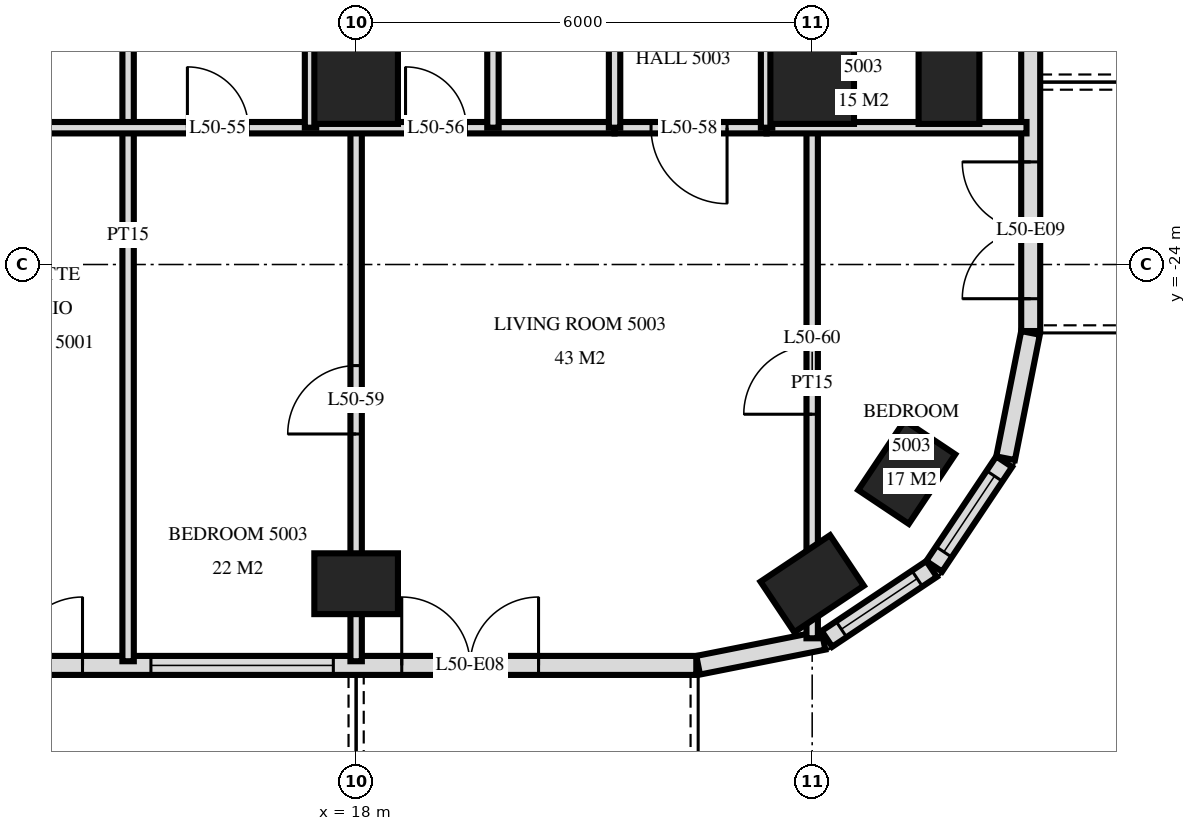
"""IFC4 building model, lengths in metres.
Left out: names, types, materials, properties, quantities, classifications, styles, units other than length and angle.
Written with IfcOpenShell. Run it as: python <this file> out.ifc"""

import sys

from ifc_helpers import new_model, si_unit, direction, frame, frame_2d, origin, origin_2d, place, context, subcontext, project, spatial, rectangle, extrude, element, fill, save


model = new_model("IFC4")
c1 = context("Model", 3, precision=1e-05, world=origin(), true_north=direction((0.0, 1.0)))
c2 = subcontext(c1, "Body", "Model", "MODEL_VIEW")
j1 = project(units=[si_unit("LENGTHUNIT", "METRE"), si_unit("PLANEANGLEUNIT", "RADIAN")], contexts=[c1])
p1 = place(None, origin())
s1 = spatial("IfcSite", under=j1, at=p1, CompositionType="ELEMENT")
p2 = place(p1, origin())
s2 = spatial("IfcBuilding", under=s1, at=p2, CompositionType="ELEMENT")
p3 = place(p2, frame((0.0, 0.0, 194.1)))
s3 = spatial("IfcBuildingStorey", under=s2, at=p3, CompositionType="ELEMENT", Elevation=194.1)
p4 = place(p3, frame((18.0, -28.2, 0.0), z_axis=(0.0, 0.0, 1.0), x_axis=(1.0, 0.0, 0.0)))
e1 = element("IfcColumn", 1, at=p4, inside=s3, PredefinedType="COLUMN", context=c2, shape_type="SweptSolid", body=[
    extrude(rectangle(XDim=1.1, YDim=0.8, at=origin_2d()), origin(), (0.0, 0.0, 1.0), 3.5),
])
p5 = place(p3, frame((18.0, -21.6, 0.0), z_axis=(0.0, 0.0, 1.0), x_axis=(1.0, 0.0, 0.0)))
e2 = element("IfcColumn", 2, at=p5, inside=s3, PredefinedType="COLUMN", context=c2, shape_type="SweptSolid", body=[
    extrude(rectangle(XDim=1.1, YDim=1.1, at=origin_2d()), origin(), (0.0, 0.0, 1.0), 3.5),
])
p6 = place(p3, frame((24.0, -28.2, 0.0), z_axis=(0.0, 0.0, 1.0), x_axis=(0.831459915646, 0.555584744817, 0.0)))
e3 = element("IfcColumn", 3, at=p6, inside=s3, PredefinedType="COLUMN", context=c2, shape_type="SweptSolid", body=[
    extrude(rectangle(XDim=1.1, YDim=0.8, at=origin_2d()), origin(), (0.0, 0.0, 1.0), 3.5),
])
p7 = place(p3, frame((24.0, -21.6, 0.0), z_axis=(0.0, 0.0, 1.0), x_axis=(1.0, 0.0, 0.0)))
e4 = element("IfcColumn", 4, at=p7, inside=s3, PredefinedType="COLUMN", context=c2, shape_type="SweptSolid", body=[
    extrude(rectangle(XDim=1.1, YDim=1.1, at=origin_2d()), origin(), (0.0, 0.0, 1.0), 3.5),
])
for number, where, z_axis, x_axis in (
    (5, (25.244, -26.733, 0.0), (0.0, 0.0, 1.0), (0.556, 0.831, 0.0)),
    (6, (25.8, -21.6, 0.0), (0.0, 0.0, 1.0), (0.0, 1.0, 0.0)),
):
    element("IfcColumn", number, at=place(p3, frame(where, z_axis=z_axis, x_axis=x_axis)), inside=s3, PredefinedType="COLUMN", context=c2, shape_type="SweptSolid", body=[
        extrude(rectangle(XDim=1.1, YDim=0.8, at=origin_2d()), origin(), (0.0, 0.0, 1.0), 3.5),
    ])
p8 = place(p3, frame((-22.475, -29.275, 0.0), z_axis=(0.0, 0.0, 1.0), x_axis=(1.0, 0.0, 0.0)))
e7 = element("IfcWall", 7, at=p8, inside=s3, PredefinedType="SOLIDWALL", context=c2, shape_type="SweptSolid", body=[
    extrude(rectangle(XDim=44.951, YDim=0.25, at=frame_2d((22.475, 0.0))), origin(), (0.0, 0.0, 1.0), 3.22),
])
p9 = place(p8, frame((0.575, 0.0, 0.0)))
e8 = element("IfcOpeningElement", 8, at=p9, cuts=e7, PredefinedType="OPENING", context=c2, shape_type="SweptSolid", body=[
    extrude(rectangle(XDim=1.8, YDim=2.4, at=frame_2d((0.9, 1.2))), frame((0.0, 0.135, 0.0), z_axis=(0.0, -1.0, 0.0), x_axis=(1.0, 0.0, 0.0)), (0.0, 0.0, 1.0), 0.27),
])
p10 = place(p8, frame((6.575, 0.0, 0.0)))
e9 = element("IfcOpeningElement", 9, at=p10, cuts=e7, PredefinedType="OPENING", context=c2, shape_type="SweptSolid", body=[
    extrude(rectangle(XDim=1.8, YDim=2.4, at=frame_2d((0.9, 1.2))), frame((0.0, 0.135, 0.0), z_axis=(0.0, -1.0, 0.0), x_axis=(1.0, 0.0, 0.0)), (0.0, 0.0, 1.0), 0.27),
])
p11 = place(p8, frame((11.075, 0.0, 0.0)))
e10 = element("IfcOpeningElement", 10, at=p11, cuts=e7, PredefinedType="OPENING", context=c2, shape_type="SweptSolid", body=[
    extrude(rectangle(XDim=1.8, YDim=2.4, at=frame_2d((0.9, 1.2))), frame((0.0, 0.135, 0.0), z_axis=(0.0, -1.0, 0.0), x_axis=(1.0, 0.0, 0.0)), (0.0, 0.0, 1.0), 0.27),
])
p12 = place(p8, frame((13.775, 0.0, 0.9)))
e11 = element("IfcOpeningElement", 11, at=p12, cuts=e7, PredefinedType="OPENING", context=c2, shape_type="SweptSolid", body=[
    extrude(rectangle(XDim=2.4, YDim=1.5, at=frame_2d((1.2, 0.75))), frame((0.0, 0.135, 0.0), z_axis=(0.0, -1.0, 0.0), x_axis=(1.0, 0.0, 0.0)), (0.0, 0.0, 1.0), 0.27),
])
p13 = place(p8, frame((16.775, 0.0, 0.9)))
e12 = element("IfcOpeningElement", 12, at=p13, cuts=e7, PredefinedType="OPENING", context=c2, shape_type="SweptSolid", body=[
    extrude(rectangle(XDim=2.4, YDim=1.5, at=frame_2d((1.2, 0.75))), frame((0.0, 0.135, 0.0), z_axis=(0.0, -1.0, 0.0), x_axis=(1.0, 0.0, 0.0)), (0.0, 0.0, 1.0), 0.27),
])
p14 = place(p8, frame((20.075, 0.0, 0.0)))
e13 = element("IfcOpeningElement", 13, at=p14, cuts=e7, PredefinedType="OPENING", context=c2, shape_type="SweptSolid", body=[
    extrude(rectangle(XDim=1.8, YDim=2.4, at=frame_2d((0.9, 1.2))), frame((0.0, 0.135, 0.0), z_axis=(0.0, -1.0, 0.0), x_axis=(1.0, 0.0, 0.0)), (0.0, 0.0, 1.0), 0.27),
])
p15 = place(p8, frame((23.075, 0.0, 0.0)))
e14 = element("IfcOpeningElement", 14, at=p15, cuts=e7, PredefinedType="OPENING", context=c2, shape_type="SweptSolid", body=[
    extrude(rectangle(XDim=1.8, YDim=2.4, at=frame_2d((0.9, 1.2))), frame((0.0, 0.135, 0.0), z_axis=(0.0, -1.0, 0.0), x_axis=(1.0, 0.0, 0.0)), (0.0, 0.0, 1.0), 0.27),
])
p16 = place(p8, frame((25.775, 0.0, 0.9)))
e15 = element("IfcOpeningElement", 15, at=p16, cuts=e7, PredefinedType="OPENING", context=c2, shape_type="SweptSolid", body=[
    extrude(rectangle(XDim=2.4, YDim=1.5, at=frame_2d((1.2, 0.75))), frame((0.0, 0.135, 0.0), z_axis=(0.0, -1.0, 0.0), x_axis=(1.0, 0.0, 0.0)), (0.0, 0.0, 1.0), 0.27),
])
p17 = place(p8, frame((29.075, 0.0, 0.0)))
e16 = element("IfcOpeningElement", 16, at=p17, cuts=e7, PredefinedType="OPENING", context=c2, shape_type="SweptSolid", body=[
    extrude(rectangle(XDim=1.8, YDim=2.4, at=frame_2d((0.9, 1.2))), frame((0.0, 0.135, 0.0), z_axis=(0.0, -1.0, 0.0), x_axis=(1.0, 0.0, 0.0)), (0.0, 0.0, 1.0), 0.27),
])
p18 = place(p8, frame((31.775, 0.0, 0.9)))
e17 = element("IfcOpeningElement", 17, at=p18, cuts=e7, PredefinedType="OPENING", context=c2, shape_type="SweptSolid", body=[
    extrude(rectangle(XDim=2.4, YDim=1.5, at=frame_2d((1.2, 0.75))), frame((0.0, 0.135, 0.0), z_axis=(0.0, -1.0, 0.0), x_axis=(1.0, 0.0, 0.0)), (0.0, 0.0, 1.0), 0.27),
])
p19 = place(p8, frame((35.075, 0.0, 0.0)))
e18 = element("IfcOpeningElement", 18, at=p19, cuts=e7, PredefinedType="OPENING", context=c2, shape_type="SweptSolid", body=[
    extrude(rectangle(XDim=1.8, YDim=2.4, at=frame_2d((0.9, 1.2))), frame((0.0, 0.135, 0.0), z_axis=(0.0, -1.0, 0.0), x_axis=(1.0, 0.0, 0.0)), (0.0, 0.0, 1.0), 0.27),
])
p20 = place(p8, frame((37.775, 0.0, 0.9)))
e19 = element("IfcOpeningElement", 19, at=p20, cuts=e7, PredefinedType="OPENING", context=c2, shape_type="SweptSolid", body=[
    extrude(rectangle(XDim=2.4, YDim=1.5, at=frame_2d((1.2, 0.75))), frame((0.0, 0.135, 0.0), z_axis=(0.0, -1.0, 0.0), x_axis=(1.0, 0.0, 0.0)), (0.0, 0.0, 1.0), 0.27),
])
p21 = place(p8, frame((41.075, 0.0, 0.0)))
e20 = element("IfcOpeningElement", 20, at=p21, cuts=e7, PredefinedType="OPENING", context=c2, shape_type="SweptSolid", body=[
    extrude(rectangle(XDim=1.8, YDim=2.4, at=frame_2d((0.9, 1.2))), frame((0.0, 0.135, 0.0), z_axis=(0.0, -1.0, 0.0), x_axis=(1.0, 0.0, 0.0)), (0.0, 0.0, 1.0), 0.27),
])
p22 = place(p3, frame((22.5, -29.273, 0.0), z_axis=(0.0, 0.0, 1.0), x_axis=(0.980775640221, 0.19513878023, 0.0)))
e21 = element("IfcWall", 21, at=p22, inside=s3, PredefinedType="SOLIDWALL", context=c2, shape_type="SweptSolid", body=[
    extrude(rectangle(XDim=1.681, YDim=0.25, at=frame_2d((0.841, 0.0))), origin(), (0.0, 0.0, 1.0), 3.22),
])
p23 = place(p3, frame((24.194, -28.926, 0.0), z_axis=(0.0, 0.0, 1.0), x_axis=(0.831482937015, 0.55555029066, 0.0)))
e22 = element("IfcWall", 22, at=p23, inside=s3, PredefinedType="SOLIDWALL", context=c2, shape_type="SweptSolid", body=[
    extrude(rectangle(XDim=1.656, YDim=0.25, at=frame_2d((0.828, 0.0))), origin(), (0.0, 0.0, 1.0), 3.22),
])
p24 = place(p23, frame((0.228, 0.0, 0.9)))
e23 = element("IfcOpeningElement", 23, at=p24, cuts=e22, PredefinedType="OPENING", context=c2, shape_type="SweptSolid", body=[
    extrude(rectangle(XDim=1.2, YDim=1.5, at=frame_2d((0.6, 0.75))), frame((0.0, 0.135, 0.0), z_axis=(0.0, -1.0, 0.0), x_axis=(1.0, 0.0, 0.0)), (0.0, 0.0, 1.0), 0.27),
])
p25 = place(p3, frame((25.606, -27.971, 0.0), z_axis=(0.0, 0.0, 1.0), x_axis=(0.55555029066, 0.831482937015, 0.0)))
e24 = element("IfcWall", 24, at=p25, inside=s3, PredefinedType="SOLIDWALL", context=c2, shape_type="SweptSolid", body=[
    extrude(rectangle(XDim=1.656, YDim=0.25, at=frame_2d((0.828, 0.0))), origin(), (0.0, 0.0, 1.0), 3.22),
])
p26 = place(p25, frame((0.228, 0.0, 0.9)))
e25 = element("IfcOpeningElement", 25, at=p26, cuts=e24, PredefinedType="OPENING", context=c2, shape_type="SweptSolid", body=[
    extrude(rectangle(XDim=1.2, YDim=1.5, at=frame_2d((0.6, 0.75))), frame((0.0, 0.135, 0.0), z_axis=(0.0, -1.0, 0.0), x_axis=(1.0, 0.0, 0.0)), (0.0, 0.0, 1.0), 0.27),
])
p27 = place(p3, frame((26.545, -26.549, 0.0), z_axis=(0.0, 0.0, 1.0), x_axis=(0.195026884138, 0.980797896849, 0.0)))
e26 = element("IfcWall", 26, at=p27, inside=s3, PredefinedType="SOLIDWALL", context=c2, shape_type="SweptSolid", body=[
    extrude(rectangle(XDim=1.681, YDim=0.25, at=frame_2d((0.841, 0.0))), origin(), (0.0, 0.0, 1.0), 3.22),
])
p28 = place(p3, frame((26.875, -24.875, 0.0), z_axis=(0.0, 0.0, 1.0), x_axis=(0.0, 1.0, 0.0)))
e27 = element("IfcWall", 27, at=p28, inside=s3, PredefinedType="SOLIDWALL", context=c2, shape_type="SweptSolid", body=[
    extrude(rectangle(XDim=21.551, YDim=0.25, at=frame_2d((10.775, 0.0))), origin(), (0.0, 0.0, 1.0), 3.22),
])
p29 = place(p28, frame((0.425, 0.0, 0.0)))
e28 = element("IfcOpeningElement", 28, at=p29, cuts=e27, PredefinedType="OPENING", context=c2, shape_type="SweptSolid", body=[
    extrude(rectangle(XDim=1.8, YDim=2.4, at=frame_2d((0.9, 1.2))), frame((0.0, 0.135, 0.0), z_axis=(0.0, -1.0, 0.0), x_axis=(1.0, 0.0, 0.0)), (0.0, 0.0, 1.0), 0.27),
])
p30 = place(p28, frame((3.875, 0.0, 0.0)))
e29 = element("IfcOpeningElement", 29, at=p30, cuts=e27, PredefinedType="OPENING", context=c2, shape_type="SweptSolid", body=[
    extrude(rectangle(XDim=1.8, YDim=2.4, at=frame_2d((0.9, 1.2))), frame((0.0, 0.135, 0.0), z_axis=(0.0, -1.0, 0.0), x_axis=(1.0, 0.0, 0.0)), (0.0, 0.0, 1.0), 0.27),
])
p31 = place(p28, frame((7.775, 0.0, 0.9)))
e30 = element("IfcOpeningElement", 30, at=p31, cuts=e27, PredefinedType="OPENING", context=c2, shape_type="SweptSolid", body=[
    extrude(rectangle(XDim=1.2, YDim=1.5, at=frame_2d((0.6, 0.75))), frame((0.0, 0.135, 0.0), z_axis=(0.0, -1.0, 0.0), x_axis=(1.0, 0.0, 0.0)), (0.0, 0.0, 1.0), 0.27),
])
p32 = place(p28, frame((11.975, 0.0, 0.0)))
e31 = element("IfcOpeningElement", 31, at=p32, cuts=e27, PredefinedType="OPENING", context=c2, shape_type="SweptSolid", body=[
    extrude(rectangle(XDim=1.8, YDim=2.4, at=frame_2d((0.9, 1.2))), frame((0.0, 0.135, 0.0), z_axis=(0.0, -1.0, 0.0), x_axis=(1.0, 0.0, 0.0)), (0.0, 0.0, 1.0), 0.27),
])
p33 = place(p3, frame((24.0, -28.918, 0.0), z_axis=(0.0, 0.0, 1.0), x_axis=(0.0, 1.0, 0.0)))
e32 = element("IfcWall", 32, at=p33, inside=s3, PredefinedType="PARTITIONING", context=c2, shape_type="SweptSolid", body=[
    extrude(rectangle(XDim=6.718, YDim=0.15, at=frame_2d((3.359, 0.0))), origin(), (0.0, 0.0, 1.0), 3.22),
])
p34 = place(p33, frame((2.948, 0.0, 0.0)))
e33 = element("IfcOpeningElement", 33, at=p34, cuts=e32, PredefinedType="OPENING", context=c2, shape_type="SweptSolid", body=[
    extrude(rectangle(XDim=0.9, YDim=2.1, at=frame_2d((0.45, 1.05))), frame((0.0, 0.085, 0.0), z_axis=(0.0, -1.0, 0.0), x_axis=(1.0, 0.0, 0.0)), (0.0, 0.0, 1.0), 0.17),
])
p35 = place(p3, frame((23.4, -22.2, 0.0), z_axis=(0.0, 0.0, 1.0), x_axis=(0.0, 1.0, 0.0)))
e34 = element("IfcWall", 34, at=p35, inside=s3, PredefinedType="PARTITIONING", context=c2, shape_type="SweptSolid", body=[
    extrude(rectangle(XDim=4.2, YDim=0.15, at=frame_2d((2.1, 0.0))), origin(), (0.0, 0.0, 1.0), 3.22),
])
p36 = place(p35, frame((1.62, 0.0, 0.0)))
e35 = element("IfcOpeningElement", 35, at=p36, cuts=e34, PredefinedType="OPENING", context=c2, shape_type="SweptSolid", body=[
    extrude(rectangle(XDim=1.0, YDim=2.1, at=frame_2d((0.5, 1.05))), frame((0.0, 0.085, 0.0), z_axis=(0.0, -1.0, 0.0), x_axis=(1.0, 0.0, 0.0)), (0.0, 0.0, 1.0), 0.17),
])
for number, where, z_axis, x_axis in (
    (36, (21.4, -22.2, 0.0), (0.0, 0.0, 1.0), (0.0, 1.0, 0.0)),
    (37, (19.8, -22.2, 0.0), (0.0, 0.0, 1.0), (0.0, 1.0, 0.0)),
):
    element("IfcWall", number, at=place(p3, frame(where, z_axis=z_axis, x_axis=x_axis)), inside=s3, PredefinedType="PARTITIONING", context=c2, shape_type="SweptSolid", body=[
        extrude(rectangle(XDim=4.2, YDim=0.15, at=frame_2d((2.1, 0.0))), origin(), (0.0, 0.0, 1.0), 3.22),
    ])
p37 = place(p3, frame((18.0, -29.22, 0.0), z_axis=(0.0, 0.0, 1.0), x_axis=(0.0, 1.0, 0.0)))
e38 = element("IfcWall", 38, at=p37, inside=s3, PredefinedType="PARTITIONING", context=c2, shape_type="SweptSolid", body=[
    extrude(rectangle(XDim=7.02, YDim=0.15, at=frame_2d((3.51, 0.0))), origin(), (0.0, 0.0, 1.0), 3.22),
])
p38 = place(p37, frame((2.99, 0.0, 0.0)))
e39 = element("IfcOpeningElement", 39, at=p38, cuts=e38, PredefinedType="OPENING", context=c2, shape_type="SweptSolid", body=[
    extrude(rectangle(XDim=0.9, YDim=2.1, at=frame_2d((0.45, 1.05))), frame((0.0, 0.085, 0.0), z_axis=(0.0, -1.0, 0.0), x_axis=(1.0, 0.0, 0.0)), (0.0, 0.0, 1.0), 0.17),
])
p39 = place(p3, frame((17.4, -22.2, 0.0), z_axis=(0.0, 0.0, 1.0), x_axis=(0.0, 1.0, 0.0)))
e40 = element("IfcWall", 40, at=p39, inside=s3, PredefinedType="PARTITIONING", context=c2, shape_type="SweptSolid", body=[
    extrude(rectangle(XDim=4.2, YDim=0.15, at=frame_2d((2.1, 0.0))), origin(), (0.0, 0.0, 1.0), 3.22),
])
p40 = place(p3, frame((15.0, -29.22, 0.0), z_axis=(0.0, 0.0, 1.0), x_axis=(0.0, 1.0, 0.0)))
e41 = element("IfcWall", 41, at=p40, inside=s3, PredefinedType="PARTITIONING", context=c2, shape_type="SweptSolid", body=[
    extrude(rectangle(XDim=11.22, YDim=0.15, at=frame_2d((5.61, 0.0))), origin(), (0.0, 0.0, 1.0), 3.22),
])
p41 = place(p3, frame((21.4, -22.2, 0.0), z_axis=(0.0, 0.0, 1.0), x_axis=(1.0, 0.0, 0.0)))
e42 = element("IfcWall", 42, at=p41, inside=s3, PredefinedType="PARTITIONING", context=c2, shape_type="SweptSolid", body=[
    extrude(rectangle(XDim=2.0, YDim=0.15, at=frame_2d((1.0, 0.0))), origin(), (0.0, 0.0, 1.0), 3.22),
])
p42 = place(p41, frame((0.48, 0.0, 0.0)))
e43 = element("IfcOpeningElement", 43, at=p42, cuts=e42, PredefinedType="OPENING", context=c2, shape_type="SweptSolid", body=[
    extrude(rectangle(XDim=1.0, YDim=2.1, at=frame_2d((0.5, 1.05))), frame((0.0, 0.085, 0.0), z_axis=(0.0, -1.0, 0.0), x_axis=(1.0, 0.0, 0.0)), (0.0, 0.0, 1.0), 0.17),
])
p43 = place(p3, frame((13.3, -22.2, 0.0), z_axis=(0.0, 0.0, 1.0), x_axis=(1.0, 0.0, 0.0)))
e44 = element("IfcWall", 44, at=p43, inside=s3, PredefinedType="PARTITIONING", context=c2, shape_type="SweptSolid", body=[
    extrude(rectangle(XDim=8.1, YDim=0.15, at=frame_2d((4.05, 0.0))), origin(), (0.0, 0.0, 1.0), 3.22),
])
p44 = place(p43, frame((2.48, 0.0, 0.0)))
e45 = element("IfcOpeningElement", 45, at=p44, cuts=e44, PredefinedType="OPENING", context=c2, shape_type="SweptSolid", body=[
    extrude(rectangle(XDim=0.8, YDim=2.1, at=frame_2d((0.4, 1.05))), frame((0.0, 0.085, 0.0), z_axis=(0.0, -1.0, 0.0), x_axis=(1.0, 0.0, 0.0)), (0.0, 0.0, 1.0), 0.17),
])
p45 = place(p43, frame((5.35, 0.0, 0.0)))
e46 = element("IfcOpeningElement", 46, at=p45, cuts=e44, PredefinedType="OPENING", context=c2, shape_type="SweptSolid", body=[
    extrude(rectangle(XDim=0.8, YDim=2.1, at=frame_2d((0.4, 1.05))), frame((0.0, 0.085, 0.0), z_axis=(0.0, -1.0, 0.0), x_axis=(1.0, 0.0, 0.0)), (0.0, 0.0, 1.0), 0.17),
])
p46 = place(p3, frame((23.4, -22.2, 0.0), z_axis=(0.0, 0.0, 1.0), x_axis=(1.0, 0.0, 0.0)))
e47 = element("IfcWall", 47, at=p46, inside=s3, PredefinedType="PARTITIONING", context=c2, shape_type="SweptSolid", body=[
    extrude(rectangle(XDim=3.42, YDim=0.15, at=frame_2d((1.71, 0.0))), origin(), (0.0, 0.0, 1.0), 3.22),
])
p47 = place(p24, origin())
e48 = element("IfcWindow", 48, at=p47, inside=s3, PartitioningType="SINGLE_PANEL", PredefinedType="WINDOW", context=c2, shape_type="SweptSolid", body=[
    extrude(rectangle(XDim=1.2, YDim=1.5, at=frame_2d((0.6, 0.75))), frame((0.0, 0.03, 0.0), z_axis=(0.0, -1.0, 0.0), x_axis=(1.0, 0.0, 0.0)), (0.0, 0.0, 1.0), 0.06),
])
fill(e23, e48)
p48 = place(p26, origin())
e49 = element("IfcWindow", 49, at=p48, inside=s3, PartitioningType="SINGLE_PANEL", PredefinedType="WINDOW", context=c2, shape_type="SweptSolid", body=[
    extrude(rectangle(XDim=1.2, YDim=1.5, at=frame_2d((0.6, 0.75))), frame((0.0, 0.03, 0.0), z_axis=(0.0, -1.0, 0.0), x_axis=(1.0, 0.0, 0.0)), (0.0, 0.0, 1.0), 0.06),
])
fill(e25, e49)
p49 = place(p19, origin())
e50 = element("IfcDoor", 50, at=p49, inside=s3, OperationType="DOUBLE_DOOR_SINGLE_SWING", PredefinedType="DOOR", context=c2, shape_type="SweptSolid", body=[
    extrude(rectangle(XDim=1.8, YDim=2.4, at=frame_2d((0.9, 1.2))), frame((0.0, 0.025, 0.0), z_axis=(0.0, -1.0, 0.0), x_axis=(1.0, 0.0, 0.0)), (0.0, 0.0, 1.0), 0.05),
])
fill(e18, e50)
p50 = place(p20, origin())
e51 = element("IfcWindow", 51, at=p50, inside=s3, PartitioningType="SINGLE_PANEL", PredefinedType="WINDOW", context=c2, shape_type="SweptSolid", body=[
    extrude(rectangle(XDim=2.4, YDim=1.5, at=frame_2d((1.2, 0.75))), frame((0.0, 0.03, 0.0), z_axis=(0.0, -1.0, 0.0), x_axis=(1.0, 0.0, 0.0)), (0.0, 0.0, 1.0), 0.06),
])
fill(e19, e51)
p51 = place(p21, origin())
e52 = element("IfcDoor", 52, at=p51, inside=s3, OperationType="DOUBLE_DOOR_SINGLE_SWING", PredefinedType="DOOR", context=c2, shape_type="SweptSolid", body=[
    extrude(rectangle(XDim=1.8, YDim=2.4, at=frame_2d((0.9, 1.2))), frame((0.0, 0.025, 0.0), z_axis=(0.0, -1.0, 0.0), x_axis=(1.0, 0.0, 0.0)), (0.0, 0.0, 1.0), 0.05),
])
fill(e20, e52)
p52 = place(p29, origin())
e53 = element("IfcDoor", 53, at=p52, inside=s3, OperationType="DOUBLE_DOOR_SINGLE_SWING", PredefinedType="DOOR", context=c2, shape_type="SweptSolid", body=[
    extrude(rectangle(XDim=1.8, YDim=2.4, at=frame_2d((0.9, 1.2))), frame((0.0, 0.025, 0.0), z_axis=(0.0, -1.0, 0.0), x_axis=(1.0, 0.0, 0.0)), (0.0, 0.0, 1.0), 0.05),
])
fill(e28, e53)
p53 = place(p44, origin())
e54 = element("IfcDoor", 54, at=p53, inside=s3, OperationType="SINGLE_SWING_RIGHT", PredefinedType="DOOR", context=c2, shape_type="SweptSolid", body=[
    extrude(rectangle(XDim=0.8, YDim=2.1, at=frame_2d((0.4, 1.05))), frame((0.0, 0.025, 0.0), z_axis=(0.0, -1.0, 0.0), x_axis=(1.0, 0.0, 0.0)), (0.0, 0.0, 1.0), 0.05),
])
fill(e45, e54)
p54 = place(p45, origin())
e55 = element("IfcDoor", 55, at=p54, inside=s3, OperationType="SINGLE_SWING_RIGHT", PredefinedType="DOOR", context=c2, shape_type="SweptSolid", body=[
    extrude(rectangle(XDim=0.8, YDim=2.1, at=frame_2d((0.4, 1.05))), frame((0.0, 0.025, 0.0), z_axis=(0.0, -1.0, 0.0), x_axis=(1.0, 0.0, 0.0)), (0.0, 0.0, 1.0), 0.05),
])
fill(e46, e55)
p55 = place(p42, frame((0.5, 0.0, 0.0), z_axis=(0.0, 0.0, 1.0), x_axis=(-1.0, 0.0, 0.0)))
e56 = element("IfcDoor", 56, at=p55, inside=s3, OperationType="SINGLE_SWING_RIGHT", PredefinedType="DOOR", context=c2, shape_type="SweptSolid", body=[
    extrude(rectangle(XDim=1.0, YDim=2.1, at=frame_2d((0.0, 1.05))), frame((0.0, -0.025, 0.0), z_axis=(0.0, 1.0, 0.0), x_axis=(-1.0, 0.0, 0.0)), (0.0, 0.0, 1.0), 0.05),
])
fill(e43, e56)
p56 = place(p38, origin())
e57 = element("IfcDoor", 57, at=p56, inside=s3, OperationType="SINGLE_SWING_RIGHT", PredefinedType="DOOR", context=c2, shape_type="SweptSolid", body=[
    extrude(rectangle(XDim=0.9, YDim=2.1, at=frame_2d((0.45, 1.05))), frame((0.0, 0.025, 0.0), z_axis=(0.0, -1.0, 0.0), x_axis=(1.0, 0.0, 0.0)), (0.0, 0.0, 1.0), 0.05),
])
fill(e39, e57)
p57 = place(p34, origin())
e58 = element("IfcDoor", 58, at=p57, inside=s3, OperationType="SINGLE_SWING_RIGHT", PredefinedType="DOOR", context=c2, shape_type="SweptSolid", body=[
    extrude(rectangle(XDim=0.9, YDim=2.1, at=frame_2d((0.45, 1.05))), frame((0.0, 0.025, 0.0), z_axis=(0.0, -1.0, 0.0), x_axis=(1.0, 0.0, 0.0)), (0.0, 0.0, 1.0), 0.05),
])
fill(e33, e58)
save(model, sys.argv[1])
